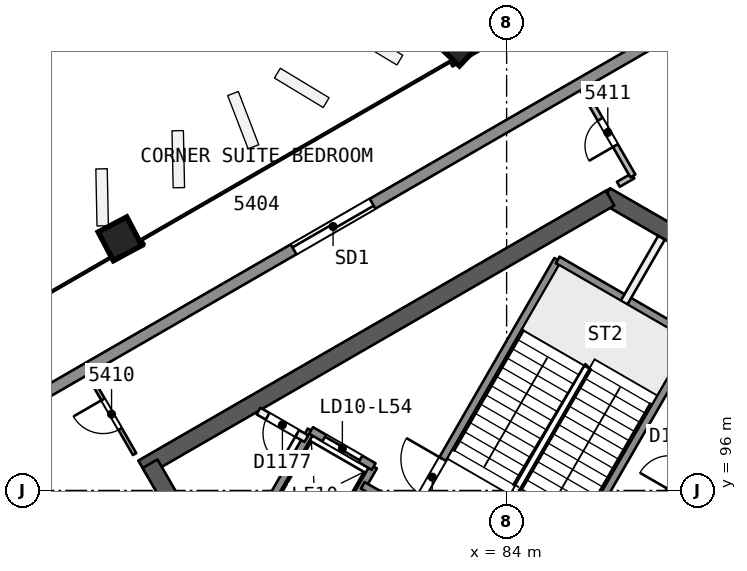
"""IFC4 building model, lengths in metres.
Left out: names, types, materials, properties, quantities, classifications, styles, units other than length and angle.
Written with IfcOpenShell. Run it as: python <this file> out.ifc"""

import sys

from ifc_helpers import new_model, si_unit, direction, frame, frame_2d, origin, origin_2d, place, context, subcontext, project, spatial, rectangle, extrude, element, fill, save


model = new_model("IFC4")
c1 = context("Model", 3, precision=1e-05, world=origin(), true_north=direction((0.0, 1.0)))
c2 = subcontext(c1, "Body", "Model", "MODEL_VIEW")
j1 = project(units=[si_unit("LENGTHUNIT", "METRE"), si_unit("PLANEANGLEUNIT", "RADIAN")], contexts=[c1])
p1 = place(None, origin())
s1 = spatial("IfcSite", under=j1, at=p1, CompositionType="ELEMENT")
p2 = place(p1, origin())
s2 = spatial("IfcBuilding", under=s1, at=p2, CompositionType="ELEMENT")
p3 = place(p2, frame((0.0, 0.0, 220.6)))
s3 = spatial("IfcBuildingStorey", under=s2, at=p3, CompositionType="ELEMENT", Elevation=220.6)
p4 = place(p3, frame((89.655, 101.998, 0.0), z_axis=(0.0, 0.0, 1.0), x_axis=(-0.866042179588, 0.49997094233, 0.0)))
e1 = element("IfcWall", 1, at=p4, inside=s3, PredefinedType="SHEAR", context=c2, shape_type="SweptSolid", body=[
    extrude(rectangle(XDim=3.515, YDim=0.45, at=frame_2d((1.758, 0.0))), origin(), (0.0, 0.0, 1.0), 3.7),
])
p5 = place(p3, frame((86.723, 103.69, 0.0), z_axis=(0.0, 0.0, 1.0), x_axis=(-0.866022713978, -0.500004658852, 0.0)))
e2 = element("IfcWall", 2, at=p5, inside=s3, PredefinedType="SHEAR", context=c2, shape_type="SweptSolid", body=[
    extrude(rectangle(XDim=14.203, YDim=0.45, at=frame_2d((7.102, 0.0))), origin(), (0.0, 0.0, 1.0), 3.7),
])
p6 = place(p3, frame((74.617, 96.701, 0.0), z_axis=(0.0, 0.0, 1.0), x_axis=(0.499994385119, -0.866028645513, 0.0)))
e3 = element("IfcWall", 3, at=p6, inside=s3, PredefinedType="SHEAR", context=c2, shape_type="SweptSolid", body=[
    extrude(rectangle(XDim=10.155, YDim=0.45, at=frame_2d((5.077, 0.0))), origin(), (0.0, 0.0, 1.0), 3.7),
])
p7 = place(p6, frame((8.005, 0.0, 0.0)))
e4 = element("IfcOpeningElement", 4, at=p7, cuts=e3, PredefinedType="OPENING", context=c2, shape_type="SweptSolid", body=[
    extrude(rectangle(XDim=1.2, YDim=2.1, at=frame_2d((0.6, 1.05))), frame((0.0, 0.235, 0.0), z_axis=(0.0, -1.0, 0.0), x_axis=(1.0, 0.0, 0.0)), (0.0, 0.0, 1.0), 0.471),
])
p8 = place(p3, frame((82.752, 107.803, 0.0), z_axis=(-0.00837646992, -0.028097450282, 0.999570091609), x_axis=(0.866174253108, 0.499288249334, 0.021293363534)))
e5 = element("IfcColumn", 5, at=p8, inside=s3, PredefinedType="COLUMN", context=c2, shape_type="SweptSolid", body=[
    extrude(rectangle(XDim=0.85, YDim=0.85, at=origin_2d()), origin(), (0.0, 0.0, 1.0), 3.702),
])
p9 = place(p3, frame((73.825, 102.649, 0.0), z_axis=(0.000857578916, -0.022824792675, 0.999739112668), x_axis=(0.866059992904, 0.499826241631, 0.010668498825)))
e6 = element("IfcColumn", 6, at=p9, inside=s3, PredefinedType="COLUMN", context=c2, shape_type="SweptSolid", body=[
    extrude(rectangle(XDim=0.85, YDim=0.85, at=origin_2d()), origin(), (0.0, 0.0, 1.0), 3.701),
])
p10 = place(p3, frame((74.21, 96.956, 0.0), z_axis=(0.0, 0.0, 1.0), x_axis=(-0.49995203611, 0.866053093978, 0.0)))
e7 = element("IfcWall", 7, at=p10, inside=s3, PredefinedType="PARTITIONING", context=c2, shape_type="SweptSolid", body=[
    extrude(rectangle(XDim=2.424, YDim=0.1, at=frame_2d((1.212, 0.0))), origin(), (0.0, 0.0, 1.0), 3.3),
])
p11 = place(p10, frame((0.762, 0.0, 0.0)))
e8 = element("IfcOpeningElement", 8, at=p11, cuts=e7, PredefinedType="OPENING", context=c2, shape_type="SweptSolid", body=[
    extrude(rectangle(XDim=0.9, YDim=2.1, at=frame_2d((0.45, 1.05))), frame((0.0, 0.061, 0.0), z_axis=(0.0, -1.0, 0.0), x_axis=(1.0, 0.0, 0.0)), (0.0, 0.0, 1.0), 0.121),
])
p12 = place(p3, frame((68.408, 96.405, 0.0), z_axis=(0.0, 0.0, 1.0), x_axis=(0.500019340035, -0.866014237522, 0.0)))
e9 = element("IfcWall", 9, at=p12, inside=s3, PredefinedType="PARTITIONING", context=c2, shape_type="SweptSolid", body=[
    extrude(rectangle(XDim=7.403, YDim=0.2, at=frame_2d((3.702, 0.0))), origin(), (0.0, 0.0, 1.0), 3.3),
])
p13 = place(p3, frame((86.941, 104.054, 0.0), z_axis=(0.0, 0.0, 1.0), x_axis=(0.866019606374, 0.500010041276, 0.0)))
e10 = element("IfcWall", 10, at=p13, inside=s3, PredefinedType="PARTITIONING", context=c2, shape_type="SweptSolid", body=[
    extrude(rectangle(XDim=0.441, YDim=0.15, at=frame_2d((0.22, 0.0))), origin(), (0.0, 0.0, 1.0), 3.3),
])
p14 = place(p3, frame((87.323, 104.275, 0.0), z_axis=(0.0, 0.0, 1.0), x_axis=(-0.50000507839, 0.866022471755, 0.0)))
e11 = element("IfcWall", 11, at=p14, inside=s3, PredefinedType="PARTITIONING", context=c2, shape_type="SweptSolid", body=[
    extrude(rectangle(XDim=2.642, YDim=0.15, at=frame_2d((1.321, 0.0))), origin(), (0.0, 0.0, 1.0), 3.3),
])
p15 = place(p14, frame((0.921, 0.0, 0.0)))
e12 = element("IfcOpeningElement", 12, at=p15, cuts=e11, PredefinedType="OPENING", context=c2, shape_type="SweptSolid", body=[
    extrude(rectangle(XDim=0.8, YDim=2.1, at=frame_2d((0.4, 1.05))), frame((0.0, 0.085, 0.0), z_axis=(0.0, -1.0, 0.0), x_axis=(1.0, 0.0, 0.0)), (0.0, 0.0, 1.0), 0.171),
])
p16 = place(p3, frame((88.155, 107.978, 0.0), z_axis=(0.0, 0.0, 1.0), x_axis=(0.866044673852, -0.499966621779, 0.0)))
e13 = element("IfcWall", 13, at=p16, inside=s3, PredefinedType="SOLIDWALL", context=c2, shape_type="SweptSolid", body=[
    extrude(rectangle(XDim=5.193, YDim=0.3, at=frame_2d((2.597, 0.0))), origin(), (0.0, 0.0, 1.0), 3.3),
])
p17 = place(p3, frame((44.193, 82.596, 0.0), z_axis=(0.0, 0.0, 1.0), x_axis=(0.866024521231, 0.500001528624, 0.0)))
e14 = element("IfcWall", 14, at=p17, inside=s3, PredefinedType="SOLIDWALL", context=c2, shape_type="SweptSolid", body=[
    extrude(rectangle(XDim=50.762, YDim=0.3, at=frame_2d((25.381, 0.0))), origin(), (0.0, 0.0, 1.0), 3.3),
])
p18 = place(p17, frame((24.337, 0.0, 0.0)))
e15 = element("IfcOpeningElement", 15, at=p18, cuts=e14, PredefinedType="OPENING", context=c2, shape_type="SweptSolid", body=[
    extrude(rectangle(XDim=2.4, YDim=2.4, at=frame_2d((1.2, 1.2))), frame((0.0, 0.161, 0.0), z_axis=(0.0, -1.0, 0.0), x_axis=(1.0, 0.0, 0.0)), (0.0, 0.0, 1.0), 0.321),
])
p19 = place(p17, frame((29.325, 0.0, 0.0)))
e16 = element("IfcOpeningElement", 16, at=p19, cuts=e14, PredefinedType="OPENING", context=c2, shape_type="SweptSolid", body=[
    extrude(rectangle(XDim=2.4, YDim=2.4, at=frame_2d((1.2, 1.2))), frame((0.0, 0.161, 0.0), z_axis=(0.0, -1.0, 0.0), x_axis=(1.0, 0.0, 0.0)), (0.0, 0.0, 1.0), 0.321),
])
p20 = place(p17, frame((39.492, 0.0, 0.0)))
e17 = element("IfcOpeningElement", 17, at=p20, cuts=e14, PredefinedType="OPENING", context=c2, shape_type="SweptSolid", body=[
    extrude(rectangle(XDim=2.4, YDim=2.4, at=frame_2d((1.2, 1.2))), frame((0.0, 0.161, 0.0), z_axis=(0.0, -1.0, 0.0), x_axis=(1.0, 0.0, 0.0)), (0.0, 0.0, 1.0), 0.321),
])
p21 = place(p17, frame((19.193, 0.0, 0.0)))
e18 = element("IfcOpeningElement", 18, at=p21, cuts=e14, PredefinedType="OPENING", context=c2, shape_type="SweptSolid", body=[
    extrude(rectangle(XDim=2.4, YDim=2.4, at=frame_2d((1.2, 1.2))), frame((0.0, 0.161, 0.0), z_axis=(0.0, -1.0, 0.0), x_axis=(1.0, 0.0, 0.0)), (0.0, 0.0, 1.0), 0.321),
])
p22 = place(p17, frame((8.878, 0.0, 0.0)))
e19 = element("IfcOpeningElement", 19, at=p22, cuts=e14, PredefinedType="OPENING", context=c2, shape_type="SweptSolid", body=[
    extrude(rectangle(XDim=2.4, YDim=2.4, at=frame_2d((1.2, 1.2))), frame((0.0, 0.161, 0.0), z_axis=(0.0, -1.0, 0.0), x_axis=(1.0, 0.0, 0.0)), (0.0, 0.0, 1.0), 0.321),
])
p23 = place(p3, frame((87.621, 94.86, 0.0), z_axis=(0.0, 0.0, 1.0), x_axis=(0.499993116331, 0.866029378036, 0.0)))
e20 = element("IfcWall", 20, at=p23, inside=s3, PredefinedType="PARTITIONING", context=c2, shape_type="SweptSolid", body=[
    extrude(rectangle(XDim=3.618, YDim=0.15, at=frame_2d((1.809, 0.0))), origin(), (0.0, 0.0, 1.0), 3.3),
])
p24 = place(p23, frame((1.332, 0.0, 0.0)))
e21 = element("IfcOpeningElement", 21, at=p24, cuts=e20, PredefinedType="OPENING", context=c2, shape_type="SweptSolid", body=[
    extrude(rectangle(XDim=0.9, YDim=2.1, at=frame_2d((0.45, 1.05))), frame((0.0, 0.085, 0.0), z_axis=(0.0, -1.0, 0.0), x_axis=(1.0, 0.0, 0.0)), (0.0, 0.0, 1.0), 0.171),
])
p25 = place(p3, frame((85.087, 93.321, 0.0), z_axis=(0.0, 0.0, 1.0), x_axis=(0.500019787375, 0.866013979237, 0.0)))
e22 = element("IfcWall", 22, at=p25, inside=s3, PredefinedType="SOLIDWALL", context=c2, shape_type="SweptSolid", body=[
    extrude(rectangle(XDim=7.7, YDim=0.2, at=frame_2d((3.85, 0.0))), origin(), (0.0, 0.0, 1.0), 3.3),
])
p26 = place(p3, frame((87.09, 100.94, 0.0), z_axis=(0.0, 0.0, 1.0), x_axis=(0.500011643316, 0.866018681408, 0.0)))
e23 = element("IfcWall", 23, at=p26, inside=s3, PredefinedType="PARTITIONING", context=c2, shape_type="SweptSolid", body=[
    extrude(rectangle(XDim=1.973, YDim=0.2, at=frame_2d((0.987, 0.0))), origin(), (0.0, 0.0, 1.0), 3.3),
])
p27 = place(p3, frame((81.493, 95.396, 0.0), z_axis=(0.0, 0.0, 1.0), x_axis=(0.500006057782, 0.866021906294, 0.0)))
e24 = element("IfcWall", 24, at=p27, inside=s3, PredefinedType="SOLIDWALL", context=c2, shape_type="SweptSolid", body=[
    extrude(rectangle(XDim=7.7, YDim=0.2, at=frame_2d((3.85, 0.0))), origin(), (0.0, 0.0, 1.0), 3.3),
])
p28 = place(p27, frame((0.55, 0.0, 0.0)))
e25 = element("IfcOpeningElement", 25, at=p28, cuts=e24, PredefinedType="OPENING", context=c2, shape_type="SweptSolid", body=[
    extrude(rectangle(XDim=1.1, YDim=2.1, at=frame_2d((0.55, 1.05))), frame((0.0, 0.11, 0.0), z_axis=(0.0, -1.0, 0.0), x_axis=(1.0, 0.0, 0.0)), (0.0, 0.0, 1.0), 0.221),
])
for number, where, z_axis, x_axis in (
    (26, (78.976, 93.986, 0.0), (0.0, 0.0, 1.0), (0.5, 0.866, 0.0)),
    (27, (77.33, 94.936, 0.0), (0.0, 0.0, 1.0), (0.5, 0.866, 0.0)),
):
    element("IfcWall", number, at=place(p3, frame(where, z_axis=z_axis, x_axis=x_axis)), inside=s3, PredefinedType="SOLIDWALL", context=c2, shape_type="SweptSolid", body=[
        extrude(rectangle(XDim=3.05, YDim=0.2, at=frame_2d((1.525, 0.0))), origin(), (0.0, 0.0, 1.0), 3.3),
    ])
p29 = place(p3, frame((89.43, 90.814, 0.0), z_axis=(0.0, 0.0, 1.0), x_axis=(-0.866018983788, 0.500011119594, 0.0)))
e28 = element("IfcWall", 28, at=p29, inside=s3, PredefinedType="SOLIDWALL", context=c2, shape_type="SweptSolid", body=[
    extrude(rectangle(XDim=10.64, YDim=0.2, at=frame_2d((5.32, 0.0))), origin(), (0.0, 0.0, 1.0), 3.3),
])
p30 = place(p29, frame((0.37, 0.0, 0.0)))
e29 = element("IfcOpeningElement", 29, at=p30, cuts=e28, PredefinedType="OPENING", context=c2, shape_type="SweptSolid", body=[
    extrude(rectangle(XDim=0.9, YDim=2.1, at=frame_2d((0.45, 1.05))), frame((0.0, 0.11, 0.0), z_axis=(0.0, -1.0, 0.0), x_axis=(1.0, 0.0, 0.0)), (0.0, 0.0, 1.0), 0.221),
])
p31 = place(p3, frame((78.73, 97.361, 0.0), z_axis=(0.0, 0.0, 1.0), x_axis=(-0.866045896294, 0.499964504253, 0.0)))
e30 = element("IfcWall", 30, at=p31, inside=s3, PredefinedType="PARTITIONING", context=c2, shape_type="SweptSolid", body=[
    extrude(rectangle(XDim=1.455, YDim=0.2, at=frame_2d((0.728, 0.0))), origin(), (0.0, 0.0, 1.0), 3.3),
])
p32 = place(p31, frame((0.278, 0.0, 0.0)))
e31 = element("IfcOpeningElement", 31, at=p32, cuts=e30, PredefinedType="OPENING", context=c2, shape_type="SweptSolid", body=[
    extrude(rectangle(XDim=0.9, YDim=2.1, at=frame_2d((0.45, 1.05))), frame((0.0, 0.11, 0.0), z_axis=(0.0, -1.0, 0.0), x_axis=(1.0, 0.0, 0.0)), (0.0, 0.0, 1.0), 0.221),
])
p33 = place(p3, frame((80.5, 96.627, 0.0), z_axis=(0.0, 0.0, 1.0), x_axis=(-0.86601224135, 0.500022797313, 0.0)))
e32 = element("IfcWall", 32, at=p33, inside=s3, PredefinedType="SOLIDWALL", context=c2, shape_type="SweptSolid", body=[
    extrude(rectangle(XDim=1.9, YDim=0.2, at=frame_2d((0.95, 0.0))), origin(), (0.0, 0.0, 1.0), 3.3),
])
p34 = place(p33, frame((0.4, 0.0, 0.0)))
e33 = element("IfcOpeningElement", 33, at=p34, cuts=e32, PredefinedType="OPENING", context=c2, shape_type="SweptSolid", body=[
    extrude(rectangle(XDim=1.1, YDim=2.1, at=frame_2d((0.55, 1.05))), frame((0.0, 0.11, 0.0), z_axis=(0.0, -1.0, 0.0), x_axis=(1.0, 0.0, 0.0)), (0.0, 0.0, 1.0), 0.221),
])
p35 = place(p3, frame((88.937, 99.99, 0.0), z_axis=(0.0, 0.0, 1.0), x_axis=(-0.866004344652, 0.500036473714, 0.0)))
e34 = element("IfcWall", 34, at=p35, inside=s3, PredefinedType="SOLIDWALL", context=c2, shape_type="SweptSolid", body=[
    extrude(rectangle(XDim=4.15, YDim=0.2, at=frame_2d((2.075, 0.0))), origin(), (0.0, 0.0, 1.0), 3.3),
])
p36 = place(p11, origin())
e35 = element("IfcDoor", 35, at=p36, inside=s3, OperationType="SINGLE_SWING_RIGHT", PredefinedType="NOTDEFINED", context=c2, shape_type="SweptSolid", body=[
    extrude(rectangle(XDim=0.9, YDim=2.1, at=frame_2d((0.45, 1.05))), frame((0.0, 0.025, 0.0), z_axis=(0.0, -1.0, 0.0), x_axis=(1.0, 0.0, 0.0)), (0.0, 0.0, 1.0), 0.05),
])
fill(e8, e35)
p37 = place(p15, origin())
e36 = element("IfcDoor", 36, at=p37, inside=s3, OperationType="SINGLE_SWING_LEFT", PredefinedType="NOTDEFINED", context=c2, shape_type="SweptSolid", body=[
    extrude(rectangle(XDim=0.8, YDim=2.1, at=frame_2d((0.4, 1.05))), frame((0.0, 0.025, 0.0), z_axis=(0.0, -1.0, 0.0), x_axis=(1.0, 0.0, 0.0)), (0.0, 0.0, 1.0), 0.05),
])
fill(e12, e36)
p38 = place(p20, origin())
e37 = element("IfcDoor", 37, at=p38, inside=s3, OperationType="SLIDING_TO_LEFT", PredefinedType="NOTDEFINED", context=c2, shape_type="SweptSolid", body=[
    extrude(rectangle(XDim=2.4, YDim=2.4, at=frame_2d((1.2, 1.2))), frame((0.0, 0.025, 0.0), z_axis=(0.0, -1.0, 0.0), x_axis=(1.0, 0.0, 0.0)), (0.0, 0.0, 1.0), 0.05),
])
fill(e17, e37)
p39 = place(p34, origin())
e38 = element("IfcDoor", 38, at=p39, inside=s3, OperationType="SLIDING_TO_RIGHT", PredefinedType="NOTDEFINED", context=c2, shape_type="SweptSolid", body=[
    extrude(rectangle(XDim=1.1, YDim=2.1, at=frame_2d((0.55, 1.05))), frame((0.0, 0.025, 0.0), z_axis=(0.0, -1.0, 0.0), x_axis=(1.0, 0.0, 0.0)), (0.0, 0.0, 1.0), 0.05),
])
fill(e33, e38)
p40 = place(p32, origin())
e39 = element("IfcDoor", 39, at=p40, inside=s3, OperationType="SINGLE_SWING_LEFT", PredefinedType="NOTDEFINED", context=c2, shape_type="SweptSolid", body=[
    extrude(rectangle(XDim=0.9, YDim=2.1, at=frame_2d((0.45, 1.05))), frame((0.0, 0.025, 0.0), z_axis=(0.0, -1.0, 0.0), x_axis=(1.0, 0.0, 0.0)), (0.0, 0.0, 1.0), 0.05),
])
fill(e31, e39)
p41 = place(p28, origin())
e40 = element("IfcDoor", 40, at=p41, inside=s3, OperationType="SINGLE_SWING_RIGHT", PredefinedType="NOTDEFINED", context=c2, shape_type="SweptSolid", body=[
    extrude(rectangle(XDim=1.1, YDim=2.1, at=frame_2d((0.55, 1.05))), frame((0.0, 0.025, 0.0), z_axis=(0.0, -1.0, 0.0), x_axis=(1.0, 0.0, 0.0)), (0.0, 0.0, 1.0), 0.05),
])
fill(e25, e40)
save(model, sys.argv[1])
